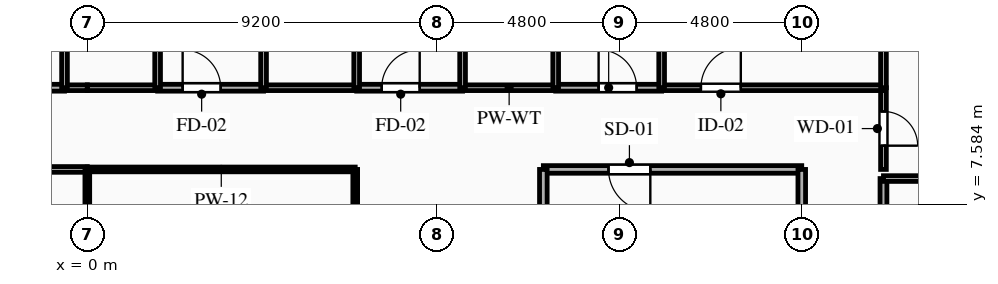
"""IFC4 building model, lengths in metres.
Left out: names, types, materials, properties, quantities, classifications, styles, units other than length and angle.
Written with IfcOpenShell. Run it as: python <this file> out.ifc"""

import sys

from ifc_helpers import new_model, si_unit, direction, frame, frame_2d, origin, place, context, subcontext, project, spatial, rectangle, extrude, element, fill, save


model = new_model("IFC4")
c1 = context("Model", 3, precision=1e-05, world=origin(), true_north=direction((0.0, 1.0)))
c2 = subcontext(c1, "Body", "Model", "MODEL_VIEW")
j1 = project(units=[si_unit("LENGTHUNIT", "METRE"), si_unit("PLANEANGLEUNIT", "RADIAN")], contexts=[c1])
p1 = place(None, origin())
s1 = spatial("IfcSite", under=j1, at=p1, CompositionType="ELEMENT")
p2 = place(p1, origin())
s2 = spatial("IfcBuilding", under=s1, at=p2, CompositionType="ELEMENT")
p3 = place(p2, frame((0.0, 0.0, 144.4)))
s3 = spatial("IfcBuildingStorey", under=s2, at=p3, CompositionType="ELEMENT", Elevation=144.4)
p4 = place(p3, frame((18.8, 8.5, 0.0), z_axis=(0.0, 0.0, 1.0), x_axis=(-1.0, 0.0, 0.0)))
e1 = element("IfcWall", 1, at=p4, inside=s3, PredefinedType="PARTITIONING", context=c2, shape_type="SweptSolid", body=[
    extrude(rectangle(XDim=6.8, YDim=0.2, at=frame_2d((3.4, 0.0))), origin(), (0.0, 0.0, 1.0), 3.04),
])
p5 = place(p4, frame((3.985, 0.0, 0.0)))
e2 = element("IfcOpeningElement", 2, at=p5, cuts=e1, PredefinedType="OPENING", context=c2, shape_type="SweptSolid", body=[
    extrude(rectangle(XDim=1.1, YDim=2.15, at=frame_2d((0.55, 1.075))), frame((0.0, 0.11, 0.0), z_axis=(0.0, -1.0, 0.0), x_axis=(1.0, 0.0, 0.0)), (0.0, 0.0, 1.0), 0.22),
])
p6 = place(p3, frame((18.8, 5.6, 0.0), z_axis=(0.0, 0.0, 1.0), x_axis=(0.0, 1.0, 0.0)))
e3 = element("IfcWall", 3, at=p6, inside=s3, PredefinedType="PARTITIONING", context=c2, shape_type="SweptSolid", body=[
    extrude(rectangle(XDim=2.9, YDim=0.2, at=frame_2d((1.45, 0.0))), origin(), (0.0, 0.0, 1.0), 2.525),
])
p7 = place(p3, frame((12.0, 8.5, 0.0), z_axis=(0.0, 0.0, 1.0), x_axis=(0.0, -1.0, 0.0)))
e4 = element("IfcWall", 4, at=p7, inside=s3, PredefinedType="PARTITIONING", context=c2, shape_type="SweptSolid", body=[
    extrude(rectangle(XDim=2.9, YDim=0.2, at=frame_2d((1.45, 0.0))), origin(), (0.0, 0.0, 1.0), 3.04),
])
p8 = place(p3, frame((-3.388, 10.65, 0.0), z_axis=(0.0, 0.0, 1.0), x_axis=(1.0, 0.0, 0.0)))
e5 = element("IfcWall", 5, at=p8, inside=s3, PredefinedType="PARTITIONING", context=c2, shape_type="SweptSolid", body=[
    extrude(rectangle(XDim=2.788, YDim=0.18, at=frame_2d((1.394, 0.0))), origin(), (0.0, 0.0, 1.0), 3.04),
])
p9 = place(p8, frame((1.129, 0.0, 0.0)))
e6 = element("IfcOpeningElement", 6, at=p9, cuts=e5, PredefinedType="OPENING", context=c2, shape_type="SweptSolid", body=[
    extrude(rectangle(XDim=1.0, YDim=2.15, at=frame_2d((0.5, 1.075))), frame((0.0, 0.1, 0.0), z_axis=(0.0, -1.0, 0.0), x_axis=(1.0, 0.0, 0.0)), (0.0, 0.0, 1.0), 0.2),
])
p10 = place(p3, frame((-0.6, 10.65, 0.0), z_axis=(0.0, 0.0, 1.0), x_axis=(1.0, 0.0, 0.0)))
e7 = element("IfcWall", 7, at=p10, inside=s3, PredefinedType="PLUMBINGWALL", context=c2, shape_type="SweptSolid", body=[
    extrude(rectangle(XDim=0.6, YDim=0.15, at=frame_2d((0.3, 0.0))), origin(), (0.0, 0.0, 1.0), 3.04),
])
p11 = place(p3, frame((0.0, 8.5, 0.0), z_axis=(0.0, 0.0, 1.0), x_axis=(-1.0, 0.0, 0.0)))
e8 = element("IfcWall", 8, at=p11, inside=s3, PredefinedType="PARTITIONING", context=c2, shape_type="SweptSolid", body=[
    extrude(rectangle(XDim=7.05, YDim=0.15, at=frame_2d((3.525, 0.0))), origin(), (0.0, 0.0, 1.0), 3.04),
])
p12 = place(p3, frame((20.95, 10.65, 0.0), z_axis=(0.0, 0.0, 1.0), x_axis=(0.0, -1.0, 0.0)))
e9 = element("IfcWall", 9, at=p12, inside=s3, PredefinedType="PARTITIONING", context=c2, shape_type="SweptSolid", body=[
    extrude(rectangle(XDim=2.15, YDim=0.15, at=frame_2d((1.075, 0.0))), origin(), (0.0, 0.0, 1.0), 3.04),
])
p13 = place(p12, frame((0.625, 0.0, 0.0)))
e10 = element("IfcOpeningElement", 10, at=p13, cuts=e9, PredefinedType="OPENING", context=c2, shape_type="SweptSolid", body=[
    extrude(rectangle(XDim=0.9, YDim=2.1, at=frame_2d((0.45, 1.05))), frame((0.0, 0.085, 0.0), z_axis=(0.0, -1.0, 0.0), x_axis=(1.0, 0.0, 0.0)), (0.0, 0.0, 1.0), 0.17),
])
p14 = place(p3, frame((1.85, 10.65, 0.0), z_axis=(0.0, 0.0, 1.0), x_axis=(1.0, 0.0, 0.0)))
e11 = element("IfcWall", 11, at=p14, inside=s3, PredefinedType="PARTITIONING", context=c2, shape_type="SweptSolid", body=[
    extrude(rectangle(XDim=2.788, YDim=0.18, at=frame_2d((1.394, 0.0))), origin(), (0.0, 0.0, 1.0), 3.04),
])
p15 = place(p14, frame((0.658, 0.0, 0.0)))
e12 = element("IfcOpeningElement", 12, at=p15, cuts=e11, PredefinedType="OPENING", context=c2, shape_type="SweptSolid", body=[
    extrude(rectangle(XDim=1.0, YDim=2.15, at=frame_2d((0.5, 1.075))), frame((0.0, 0.1, 0.0), z_axis=(0.0, -1.0, 0.0), x_axis=(1.0, 0.0, 0.0)), (0.0, 0.0, 1.0), 0.2),
])
p16 = place(p3, frame((0.0, 10.65, 0.0), z_axis=(0.0, 0.0, 1.0), x_axis=(1.0, 0.0, 0.0)))
e13 = element("IfcWall", 13, at=p16, inside=s3, PredefinedType="PLUMBINGWALL", context=c2, shape_type="SweptSolid", body=[
    extrude(rectangle(XDim=1.85, YDim=0.15, at=frame_2d((0.925, 0.0))), origin(), (0.0, 0.0, 1.0), 3.04),
])
p17 = place(p3, frame((7.088, 10.65, 0.0), z_axis=(0.0, 0.0, 1.0), x_axis=(1.0, 0.0, 0.0)))
e14 = element("IfcWall", 14, at=p17, inside=s3, PredefinedType="PARTITIONING", context=c2, shape_type="SweptSolid", body=[
    extrude(rectangle(XDim=2.787, YDim=0.18, at=frame_2d((1.394, 0.0))), origin(), (0.0, 0.0, 1.0), 3.04),
])
p18 = place(p17, frame((0.658, 0.0, 0.0)))
e15 = element("IfcOpeningElement", 15, at=p18, cuts=e14, PredefinedType="OPENING", context=c2, shape_type="SweptSolid", body=[
    extrude(rectangle(XDim=1.0, YDim=2.15, at=frame_2d((0.5, 1.075))), frame((0.0, 0.1, 0.0), z_axis=(0.0, -1.0, 0.0), x_axis=(1.0, 0.0, 0.0)), (0.0, 0.0, 1.0), 0.2),
])
p19 = place(p3, frame((4.638, 10.65, 0.0), z_axis=(0.0, 0.0, 1.0), x_axis=(1.0, 0.0, 0.0)))
e16 = element("IfcWall", 16, at=p19, inside=s3, PredefinedType="PLUMBINGWALL", context=c2, shape_type="SweptSolid", body=[
    extrude(rectangle(XDim=2.45, YDim=0.15, at=frame_2d((1.225, 0.0))), origin(), (0.0, 0.0, 1.0), 3.04),
])
p20 = place(p3, frame((12.325, 10.65, 0.0), z_axis=(0.0, 0.0, 1.0), x_axis=(1.0, 0.0, 0.0)))
e17 = element("IfcWall", 17, at=p20, inside=s3, PredefinedType="PARTITIONING", context=c2, shape_type="SweptSolid", body=[
    extrude(rectangle(XDim=2.788, YDim=0.18, at=frame_2d((1.394, 0.0))), origin(), (0.0, 0.0, 1.0), 3.04),
])
p21 = place(p20, frame((1.129, 0.0, 0.0)))
e18 = element("IfcOpeningElement", 18, at=p21, cuts=e17, PredefinedType="OPENING", context=c2, shape_type="SweptSolid", body=[
    extrude(rectangle(XDim=1.0, YDim=2.15, at=frame_2d((0.5, 1.075))), frame((0.0, 0.1, 0.0), z_axis=(0.0, -1.0, 0.0), x_axis=(1.0, 0.0, 0.0)), (0.0, 0.0, 1.0), 0.2),
])
p22 = place(p3, frame((9.875, 10.65, 0.0), z_axis=(0.0, 0.0, 1.0), x_axis=(1.0, 0.0, 0.0)))
e19 = element("IfcWall", 19, at=p22, inside=s3, PredefinedType="PLUMBINGWALL", context=c2, shape_type="SweptSolid", body=[
    extrude(rectangle(XDim=2.45, YDim=0.15, at=frame_2d((1.225, 0.0))), origin(), (0.0, 0.0, 1.0), 3.04),
])
p23 = place(p3, frame((15.113, 10.65, 0.0), z_axis=(0.0, 0.0, 1.0), x_axis=(1.0, 0.0, 0.0)))
e20 = element("IfcWall", 20, at=p23, inside=s3, PredefinedType="PARTITIONING", context=c2, shape_type="SweptSolid", body=[
    extrude(rectangle(XDim=5.837, YDim=0.15, at=frame_2d((2.918, 0.0))), origin(), (0.0, 0.0, 1.0), 3.04),
])
p24 = place(p23, frame((1.033, 0.0, 0.0)))
e21 = element("IfcOpeningElement", 21, at=p24, cuts=e20, PredefinedType="OPENING", context=c2, shape_type="SweptSolid", body=[
    extrude(rectangle(XDim=1.05, YDim=2.15, at=frame_2d((0.525, 1.075))), frame((0.0, 0.085, 0.0), z_axis=(0.0, -1.0, 0.0), x_axis=(1.0, 0.0, 0.0)), (0.0, 0.0, 1.0), 0.17),
])
p25 = place(p3, frame((7.05, 8.5, 0.0), z_axis=(0.0, 0.0, 1.0), x_axis=(-1.0, 0.0, 0.0)))
e22 = element("IfcWall", 22, at=p25, inside=s3, PredefinedType="PARTITIONING", context=c2, shape_type="SweptSolid", body=[
    extrude(rectangle(XDim=7.05, YDim=0.125, at=frame_2d((3.525, 0.0))), origin(), (0.0, 0.0, 1.0), 3.04),
])
p26 = place(p3, frame((20.95, 8.26, 0.0), z_axis=(0.0, 0.0, 1.0), x_axis=(0.0, -1.0, 0.0)))
e23 = element("IfcWall", 23, at=p26, inside=s3, PredefinedType="PARTITIONING", context=c2, shape_type="SweptSolid", body=[
    extrude(rectangle(XDim=9.57, YDim=0.18, at=frame_2d((4.785, 0.0))), origin(), (0.0, 0.0, 1.0), 3.04),
])
p27 = place(p26, frame((7.064, 0.0, 0.0)))
e24 = element("IfcOpeningElement", 24, at=p27, cuts=e23, PredefinedType="OPENING", context=c2, shape_type="SweptSolid", body=[
    extrude(rectangle(XDim=1.0, YDim=2.15, at=frame_2d((0.5, 1.075))), frame((0.0, 0.1, 0.0), z_axis=(0.0, -1.0, 0.0), x_axis=(1.0, 0.0, 0.0)), (0.0, 0.0, 1.0), 0.2),
])
p28 = place(p3, frame((7.05, -0.8, 0.0), z_axis=(0.0, 0.0, 1.0), x_axis=(0.0, 1.0, 0.0)))
e25 = element("IfcWall", 25, at=p28, inside=s3, PredefinedType="PARTITIONING", context=c2, shape_type="SweptSolid", body=[
    extrude(rectangle(XDim=9.3, YDim=0.125, at=frame_2d((4.65, 0.0))), origin(), (0.0, 0.0, 1.0), 3.04),
])
p29 = place(p28, frame((1.479, 0.0, 0.0)))
e26 = element("IfcOpeningElement", 26, at=p29, cuts=e25, PredefinedType="OPENING", context=c2, shape_type="SweptSolid", body=[
    extrude(rectangle(XDim=0.95, YDim=2.1, at=frame_2d((0.475, 1.05))), frame((0.0, 0.073, 0.0), z_axis=(0.0, -1.0, 0.0), x_axis=(1.0, 0.0, 0.0)), (0.0, 0.0, 1.0), 0.145),
])
p30 = place(p3, frame((20.95, 8.26, 0.0), z_axis=(0.0, 0.0, 1.0), x_axis=(1.0, 0.0, 0.0)))
e27 = element("IfcWall", 27, at=p30, inside=s3, PredefinedType="PARTITIONING", context=c2, shape_type="SweptSolid", body=[
    extrude(rectangle(XDim=6.05, YDim=0.15, at=frame_2d((3.025, 0.0))), origin(), (0.0, 0.0, 1.0), 3.04),
])
p31 = place(p3, frame((20.95, 10.65, 0.0), z_axis=(0.0, 0.0, 1.0), x_axis=(0.0, 1.0, 0.0)))
e28 = element("IfcWall", 28, at=p31, inside=s3, PredefinedType="PARTITIONING", context=c2, shape_type="SweptSolid", body=[
    extrude(rectangle(XDim=9.75, YDim=0.15, at=frame_2d((4.875, 0.0))), origin(), (0.0, 0.0, 1.0), 2.525),
])
for number, where, z_axis, x_axis in (
    (29, (-0.6, 12.8, 0.0), (0.0, 0.0, 1.0), (0.0, -1.0, 0.0)),
    (30, (1.85, 10.65, 0.0), (0.0, 0.0, 1.0), (0.0, 1.0, 0.0)),
    (31, (4.638, 12.8, 0.0), (0.0, 0.0, 1.0), (0.0, -1.0, 0.0)),
    (32, (7.088, 10.65, 0.0), (0.0, 0.0, 1.0), (0.0, 1.0, 0.0)),
    (33, (9.875, 12.8, 0.0), (0.0, 0.0, 1.0), (0.0, -1.0, 0.0)),
    (34, (12.325, 10.65, 0.0), (0.0, 0.0, 1.0), (0.0, 1.0, 0.0)),
):
    element("IfcWall", number, at=place(p3, frame(where, z_axis=z_axis, x_axis=x_axis)), inside=s3, PredefinedType="PLUMBINGWALL", context=c2, shape_type="SweptSolid", body=[
        extrude(rectangle(XDim=2.15, YDim=0.15, at=frame_2d((1.075, 0.0))), origin(), (0.0, 0.0, 1.0), 3.04),
    ])
p32 = place(p3, frame((15.113, 20.4, 0.0), z_axis=(0.0, 0.0, 1.0), x_axis=(0.0, -1.0, 0.0)))
e35 = element("IfcWall", 35, at=p32, inside=s3, PredefinedType="PARTITIONING", context=c2, shape_type="SweptSolid", body=[
    extrude(rectangle(XDim=9.75, YDim=0.15, at=frame_2d((4.875, 0.0))), origin(), (0.0, 0.0, 1.0), 2.525),
])
p33 = place(p3, frame((0.0, 8.5, 0.0), z_axis=(0.0, 0.0, 1.0), x_axis=(0.0, -1.0, 0.0)))
e36 = element("IfcWall", 36, at=p33, inside=s3, PredefinedType="PARTITIONING", context=c2, shape_type="SweptSolid", body=[
    extrude(rectangle(XDim=9.3, YDim=0.125, at=frame_2d((4.65, 0.0))), origin(), (0.0, 0.0, 1.0), 3.04),
])
p34 = place(p5, origin())
e37 = element("IfcDoor", 37, at=p34, inside=s3, OperationType="SINGLE_SWING_LEFT", PredefinedType="DOOR", context=c2, shape_type="SweptSolid", body=[
    extrude(rectangle(XDim=1.1, YDim=2.15, at=frame_2d((0.55, 1.075))), frame((0.0, 0.025, 0.0), z_axis=(0.0, -1.0, 0.0), x_axis=(1.0, 0.0, 0.0)), (0.0, 0.0, 1.0), 0.05),
])
fill(e2, e37)
p35 = place(p13, origin())
e38 = element("IfcDoor", 38, at=p35, inside=s3, OperationType="SINGLE_SWING_RIGHT", PredefinedType="DOOR", context=c2, shape_type="SweptSolid", body=[
    extrude(rectangle(XDim=0.9, YDim=2.1, at=frame_2d((0.45, 1.05))), frame((0.0, 0.025, 0.0), z_axis=(0.0, -1.0, 0.0), x_axis=(1.0, 0.0, 0.0)), (0.0, 0.0, 1.0), 0.05),
])
fill(e10, e38)
p36 = place(p15, origin())
e39 = element("IfcDoor", 39, at=p36, inside=s3, OperationType="SINGLE_SWING_LEFT", PredefinedType="DOOR", context=c2, shape_type="SweptSolid", body=[
    extrude(rectangle(XDim=1.0, YDim=2.15, at=frame_2d((0.5, 1.075))), frame((0.0, 0.025, 0.0), z_axis=(0.0, -1.0, 0.0), x_axis=(1.0, 0.0, 0.0)), (0.0, 0.0, 1.0), 0.05),
])
fill(e12, e39)
p37 = place(p18, origin())
e40 = element("IfcDoor", 40, at=p37, inside=s3, OperationType="SINGLE_SWING_RIGHT", PredefinedType="DOOR", context=c2, shape_type="SweptSolid", body=[
    extrude(rectangle(XDim=1.0, YDim=2.15, at=frame_2d((0.5, 1.075))), frame((0.0, 0.025, 0.0), z_axis=(0.0, -1.0, 0.0), x_axis=(1.0, 0.0, 0.0)), (0.0, 0.0, 1.0), 0.05),
])
fill(e15, e40)
p38 = place(p21, origin())
e41 = element("IfcDoor", 41, at=p38, inside=s3, OperationType="SINGLE_SWING_LEFT", PredefinedType="DOOR", context=c2, shape_type="SweptSolid", body=[
    extrude(rectangle(XDim=1.0, YDim=2.15, at=frame_2d((0.5, 1.075))), frame((0.0, 0.025, 0.0), z_axis=(0.0, -1.0, 0.0), x_axis=(1.0, 0.0, 0.0)), (0.0, 0.0, 1.0), 0.05),
])
fill(e18, e41)
p39 = place(p24, origin())
e42 = element("IfcDoor", 42, at=p39, inside=s3, OperationType="SINGLE_SWING_RIGHT", PredefinedType="DOOR", context=c2, shape_type="SweptSolid", body=[
    extrude(rectangle(XDim=1.05, YDim=2.15, at=frame_2d((0.525, 1.075))), frame((0.0, 0.025, 0.0), z_axis=(0.0, -1.0, 0.0), x_axis=(1.0, 0.0, 0.0)), (0.0, 0.0, 1.0), 0.05),
])
fill(e21, e42)
save(model, sys.argv[1])
